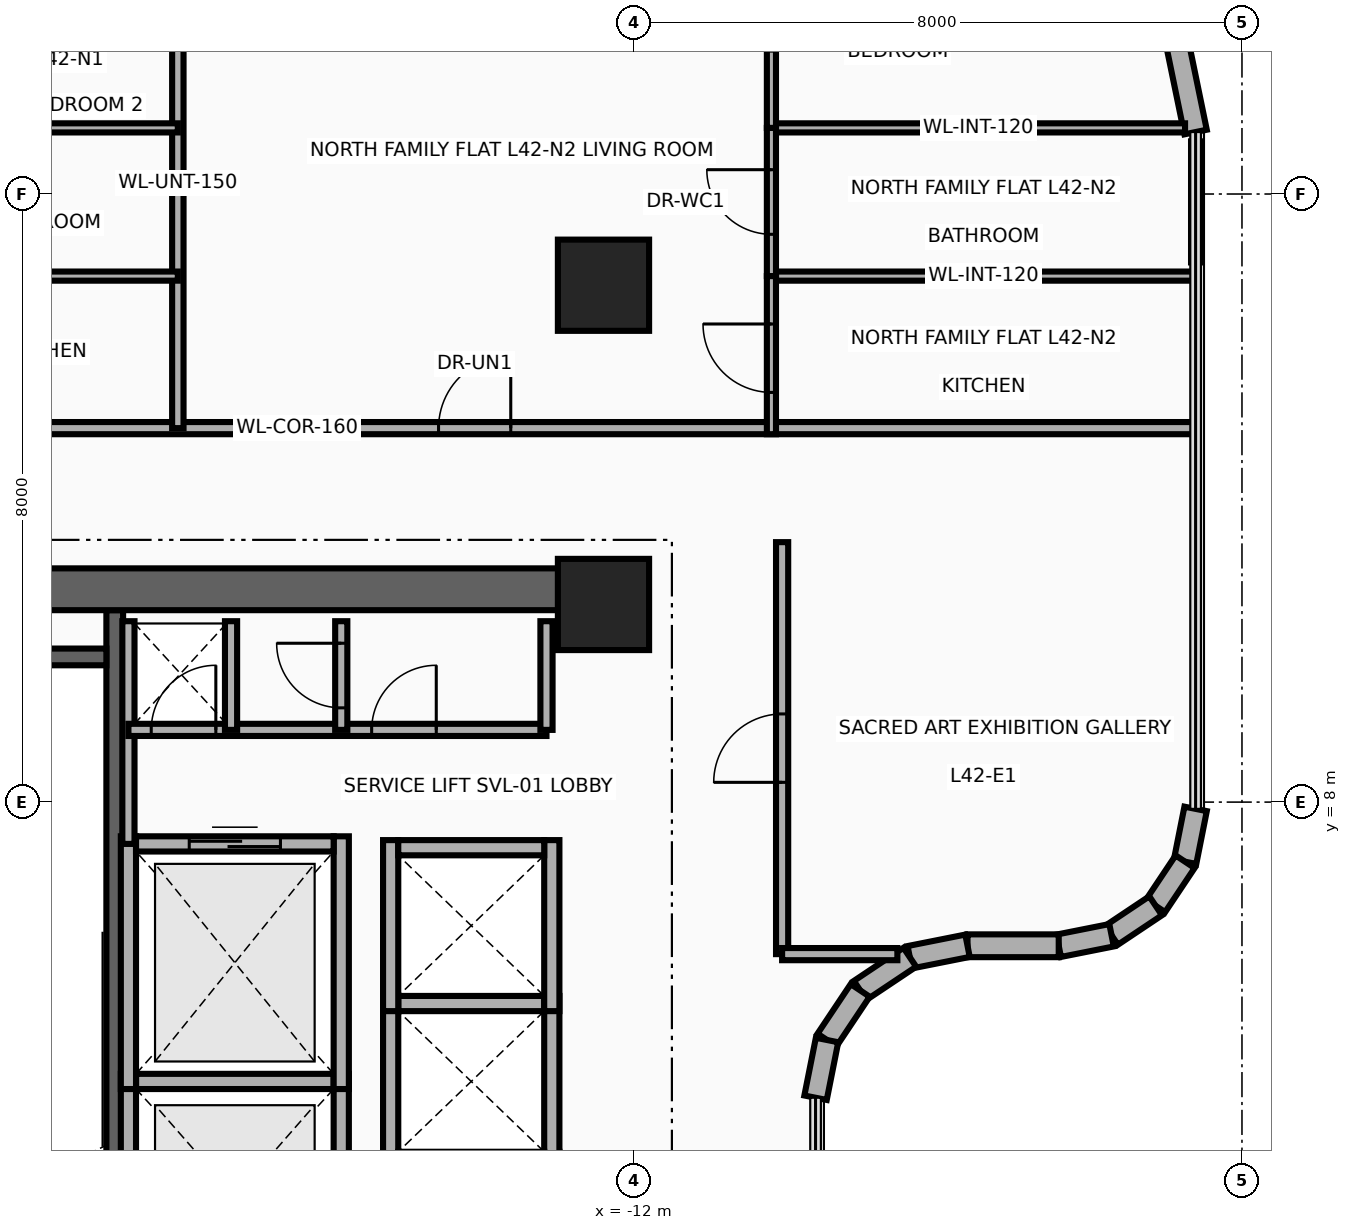
"""IFC4 building model, lengths in metres.
Left out: names, types, materials, properties, quantities, classifications, styles, units other than length and angle.
Written with IfcOpenShell. Run it as: python <this file> out.ifc"""

import sys

from ifc_helpers import new_model, si_unit, direction, frame, frame_2d, origin, origin_2d, place, context, subcontext, project, spatial, rectangle, extrude, source, transform, mapped, element, fill, save


model = new_model("IFC4")
c1 = context("Model", 3, precision=1e-05, world=origin(), true_north=direction((0.0, 1.0)))
c2 = subcontext(c1, "Body", "Model", "MODEL_VIEW")
j1 = project(units=[si_unit("LENGTHUNIT", "METRE"), si_unit("PLANEANGLEUNIT", "RADIAN")], contexts=[c1])
p1 = place(None, origin())
s1 = spatial("IfcSite", under=j1, at=p1, CompositionType="ELEMENT")
p2 = place(p1, origin())
s2 = spatial("IfcBuilding", under=s1, at=p2, CompositionType="ELEMENT")
p3 = place(p2, frame((0.0, 0.0, 164.9)))
s3 = spatial("IfcBuildingStorey", under=s2, at=p3, CompositionType="ELEMENT", Elevation=164.9)
p4 = place(p3, frame((-18.83, 1.78, 0.0), z_axis=(0.0, 0.0, 1.0), x_axis=(0.0, 1.0, 0.0)))
e1 = element("IfcWall", 1, at=p4, inside=s3, PredefinedType="SHEAR", context=c2, shape_type="SweptSolid", body=[
    extrude(rectangle(XDim=8.745, YDim=0.22, at=frame_2d((4.373, 0.0))), origin(), (0.0, 0.0, 1.0), 3.46),
])
p5 = place(p3, frame((-22.05, 9.91, 0.0), z_axis=(0.0, 0.0, 1.0), x_axis=(1.0, 0.0, 0.0)))
e2 = element("IfcWall", 2, at=p5, inside=s3, PredefinedType="SHEAR", context=c2, shape_type="SweptSolid", body=[
    extrude(rectangle(XDim=3.11, YDim=0.22, at=frame_2d((1.555, 0.0))), origin(), (0.0, 0.0, 1.0), 3.46),
])
p6 = place(p3, frame((-22.65, 10.8, 0.0), z_axis=(0.0, 0.0, 1.0), x_axis=(1.0, 0.0, 0.0)))
e3 = element("IfcWall", 3, at=p6, inside=s3, PredefinedType="SHEAR", context=c2, shape_type="SweptSolid", body=[
    extrude(rectangle(XDim=10.25, YDim=0.55, at=frame_2d((5.125, 0.0))), origin(), (0.0, 0.0, 1.0), 3.46),
])
m1 = source(origin(), c2, "Body", "SweptSolid", [
    extrude(rectangle(XDim=1.2, YDim=1.2, at=origin_2d()), origin(), (0.0, 0.0, 1.0), 3.7),
])
for number, where, z_axis, x_axis in (
    (4, (-12.4, 10.6, 0.0), (0.0, 0.0, 1.0), (1.0, 0.0, 0.0)),
    (5, (-12.4, 14.8, 0.0), (0.0, 0.0, 1.0), (1.0, 0.0, 0.0)),
):
    element("IfcColumn", number, at=place(p3, frame(where, z_axis=z_axis, x_axis=x_axis)), inside=s3, PredefinedType="COLUMN", context=c2, shape_type="MappedRepresentation", body=[
        mapped(m1, transform((0.0, 0.0, 0.0), x_axis=(1.0, 0.0, 0.0), y_axis=(0.0, 1.0, 0.0), z_axis=(0.0, 0.0, 1.0), scale=1.0)),
    ])
p7 = place(p3, frame((-4.863, 18.046, 0.0), z_axis=(0.0, 0.0, 1.0), x_axis=(0.201532282172, -0.97948187285, 0.0)))
e6 = element("IfcWall", 6, at=p7, inside=s3, PredefinedType="SOLIDWALL", context=c2, shape_type="SweptSolid", body=[
    extrude(rectangle(XDim=1.256, YDim=0.3, at=frame_2d((0.628, 0.0))), origin(), (0.0, 0.0, 1.0), 3.46),
])
p8 = place(p3, frame((-4.61, 7.911, 0.0), z_axis=(0.0, 0.0, 1.0), x_axis=(-0.194989739953, -0.980805282058, 0.0)))
e7 = element("IfcWall", 7, at=p8, inside=s3, PredefinedType="SOLIDWALL", context=c2, shape_type="SweptSolid", body=[
    extrude(rectangle(XDim=0.709, YDim=0.3, at=frame_2d((0.354, 0.0))), origin(), (0.0, 0.0, 1.0), 3.46),
])
for number, where, z_axis, x_axis in (
    (8, (-4.748, 7.216, 0.0), (0.0, 0.0, 1.0), (-0.555, -0.832, 0.0)),
    (9, (-5.136, 6.636, 0.0), (0.0, 0.0, 1.0), (-0.832, -0.555, 0.0)),
):
    element("IfcWall", number, at=place(p3, frame(where, z_axis=z_axis, x_axis=x_axis)), inside=s3, PredefinedType="SOLIDWALL", context=c2, shape_type="SweptSolid", body=[
        extrude(rectangle(XDim=0.698, YDim=0.3, at=frame_2d((0.349, 0.0))), origin(), (0.0, 0.0, 1.0), 3.46),
    ])
p9 = place(p3, frame((-5.716, 6.248, 0.0), z_axis=(0.0, 0.0, 1.0), x_axis=(-0.980805282058, -0.194989739953, 0.0)))
e10 = element("IfcWall", 10, at=p9, inside=s3, PredefinedType="SOLIDWALL", context=c2, shape_type="SweptSolid", body=[
    extrude(rectangle(XDim=0.709, YDim=0.3, at=frame_2d((0.354, 0.0))), origin(), (0.0, 0.0, 1.0), 3.46),
])
p10 = place(p3, frame((-6.411, 6.11, 0.0), z_axis=(0.0, 0.0, 1.0), x_axis=(-1.0, 0.0, 0.0)))
e11 = element("IfcWall", 11, at=p10, inside=s3, PredefinedType="SOLIDWALL", context=c2, shape_type="SweptSolid", body=[
    extrude(rectangle(XDim=1.2, YDim=0.3, at=frame_2d((0.6, 0.0))), origin(), (0.0, 0.0, 1.0), 3.46),
])
p11 = place(p3, frame((-7.611, 6.11, 0.0), z_axis=(0.0, 0.0, 1.0), x_axis=(-0.98076219082, -0.195206365311, 0.0)))
e12 = element("IfcWall", 12, at=p11, inside=s3, PredefinedType="SOLIDWALL", context=c2, shape_type="SweptSolid", body=[
    extrude(rectangle(XDim=0.774, YDim=0.3, at=frame_2d((0.387, 0.0))), origin(), (0.0, 0.0, 1.0), 3.46),
])
for number, where, z_axis, x_axis in (
    (13, (-8.37, 5.959, 0.0), (0.0, 0.0, 1.0), (-0.831, -0.556, 0.0)),
    (14, (-9.023, 5.523, 0.0), (0.0, 0.0, 1.0), (-0.556, -0.831, 0.0)),
):
    element("IfcWall", number, at=place(p3, frame(where, z_axis=z_axis, x_axis=x_axis)), inside=s3, PredefinedType="SOLIDWALL", context=c2, shape_type="SweptSolid", body=[
        extrude(rectangle(XDim=0.785, YDim=0.3, at=frame_2d((0.393, 0.0))), origin(), (0.0, 0.0, 1.0), 3.46),
    ])
p12 = place(p3, frame((-9.459, 4.87, 0.0), z_axis=(0.0, 0.0, 1.0), x_axis=(-0.195206365311, -0.98076219082, 0.0)))
e15 = element("IfcWall", 15, at=p12, inside=s3, PredefinedType="SOLIDWALL", context=c2, shape_type="SweptSolid", body=[
    extrude(rectangle(XDim=0.774, YDim=0.3, at=frame_2d((0.387, 0.0))), origin(), (0.0, 0.0, 1.0), 3.46),
])
for number, where, z_axis, x_axis in (
    (16, (-18.65, 1.2, 0.0), (0.0, 0.0, 1.0), (0.0, 1.0, 0.0)),
    (17, (-15.85, 1.2, 0.0), (0.0, 0.0, 1.0), (0.0, 1.0, 0.0)),
):
    element("IfcWall", number, at=place(p3, frame(where, z_axis=z_axis, x_axis=x_axis)), inside=s3, PredefinedType="MOVABLE", context=c2, shape_type="SweptSolid", body=[
        extrude(rectangle(XDim=3.225, YDim=0.2, at=frame_2d((1.613, 0.0))), origin(), (0.0, 0.0, 1.0), 3.46),
    ])
p13 = place(p3, frame((-18.55, 4.325, 0.0), z_axis=(0.0, 0.0, 1.0), x_axis=(1.0, 0.0, 0.0)))
e18 = element("IfcWall", 18, at=p13, inside=s3, PredefinedType="MOVABLE", context=c2, shape_type="SweptSolid", body=[
    extrude(rectangle(XDim=2.6, YDim=0.2, at=frame_2d((1.3, 0.0))), origin(), (0.0, 0.0, 1.0), 3.46),
])
for number, where, z_axis, x_axis in (
    (19, (-18.65, 4.225, 0.0), (0.0, 0.0, 1.0), (0.0, 1.0, 0.0)),
    (20, (-15.85, 4.225, 0.0), (0.0, 0.0, 1.0), (0.0, 1.0, 0.0)),
):
    element("IfcWall", number, at=place(p3, frame(where, z_axis=z_axis, x_axis=x_axis)), inside=s3, PredefinedType="MOVABLE", context=c2, shape_type="SweptSolid", body=[
        extrude(rectangle(XDim=3.325, YDim=0.2, at=frame_2d((1.663, 0.0))), origin(), (0.0, 0.0, 1.0), 3.46),
    ])
p14 = place(p3, frame((-18.55, 7.45, 0.0), z_axis=(0.0, 0.0, 1.0), x_axis=(1.0, 0.0, 0.0)))
e21 = element("IfcWall", 21, at=p14, inside=s3, PredefinedType="MOVABLE", context=c2, shape_type="SweptSolid", body=[
    extrude(rectangle(XDim=2.6, YDim=0.2, at=frame_2d((1.3, 0.0))), origin(), (0.0, 0.0, 1.0), 3.46),
])
p15 = place(p14, frame((0.7, 0.0, 0.0)))
e22 = element("IfcOpeningElement", 22, at=p15, cuts=e21, PredefinedType="OPENING", context=c2, shape_type="SweptSolid", body=[
    extrude(rectangle(XDim=1.2, YDim=2.1, at=frame_2d((0.6, 1.05))), frame((0.0, 0.115, 0.0), z_axis=(0.0, -1.0, 0.0), x_axis=(1.0, 0.0, 0.0)), (0.0, 0.0, 1.0), 0.23),
])
for number, where, z_axis, x_axis in (
    (23, (-15.2, 3.2, 0.0), (0.0, 0.0, 1.0), (0.0, 1.0, 0.0)),
    (24, (-13.08, 3.2, 0.0), (0.0, 0.0, 1.0), (0.0, 1.0, 0.0)),
):
    element("IfcWall", number, at=place(p3, frame(where, z_axis=z_axis, x_axis=x_axis)), inside=s3, PredefinedType="MOVABLE", context=c2, shape_type="SweptSolid", body=[
        extrude(rectangle(XDim=2.25, YDim=0.2, at=frame_2d((1.125, 0.0))), origin(), (0.0, 0.0, 1.0), 3.46),
    ])
p16 = place(p3, frame((-15.1, 5.35, 0.0), z_axis=(0.0, 0.0, 1.0), x_axis=(1.0, 0.0, 0.0)))
e25 = element("IfcWall", 25, at=p16, inside=s3, PredefinedType="MOVABLE", context=c2, shape_type="SweptSolid", body=[
    extrude(rectangle(XDim=1.92, YDim=0.2, at=frame_2d((0.96, 0.0))), origin(), (0.0, 0.0, 1.0), 3.46),
])
for number, where, z_axis, x_axis in (
    (26, (-15.2, 5.25, 0.0), (0.0, 0.0, 1.0), (0.0, 1.0, 0.0)),
    (27, (-13.08, 5.25, 0.0), (0.0, 0.0, 1.0), (0.0, 1.0, 0.0)),
):
    element("IfcWall", number, at=place(p3, frame(where, z_axis=z_axis, x_axis=x_axis)), inside=s3, PredefinedType="MOVABLE", context=c2, shape_type="SweptSolid", body=[
        extrude(rectangle(XDim=2.25, YDim=0.2, at=frame_2d((1.125, 0.0))), origin(), (0.0, 0.0, 1.0), 3.46),
    ])
p17 = place(p3, frame((-15.1, 7.4, 0.0), z_axis=(0.0, 0.0, 1.0), x_axis=(1.0, 0.0, 0.0)))
e28 = element("IfcWall", 28, at=p17, inside=s3, PredefinedType="MOVABLE", context=c2, shape_type="SweptSolid", body=[
    extrude(rectangle(XDim=1.92, YDim=0.2, at=frame_2d((0.96, 0.0))), origin(), (0.0, 0.0, 1.0), 3.46),
])
p18 = place(p3, frame((-18.65, 7.45, 0.0), z_axis=(0.0, 0.0, 1.0), x_axis=(0.0, 1.0, 0.0)))
e29 = element("IfcWall", 29, at=p18, inside=s3, PredefinedType="PARTITIONING", context=c2, shape_type="SweptSolid", body=[
    extrude(rectangle(XDim=2.93, YDim=0.16, at=frame_2d((1.465, 0.0))), origin(), (0.0, 0.0, 1.0), 3.46),
])
p19 = place(p3, frame((-18.65, 8.95, 0.0), z_axis=(0.0, 0.0, 1.0), x_axis=(1.0, 0.0, 0.0)))
e30 = element("IfcWall", 30, at=p19, inside=s3, PredefinedType="PARTITIONING", context=c2, shape_type="SweptSolid", body=[
    extrude(rectangle(XDim=5.5, YDim=0.16, at=frame_2d((2.75, 0.0))), origin(), (0.0, 0.0, 1.0), 3.46),
])
p20 = place(p19, frame((0.3, 0.0, 0.0)))
e31 = element("IfcOpeningElement", 31, at=p20, cuts=e30, PredefinedType="OPENING", context=c2, shape_type="SweptSolid", body=[
    extrude(rectangle(XDim=0.85, YDim=2.05, at=frame_2d((0.425, 1.025))), frame((0.0, 0.095, 0.0), z_axis=(0.0, -1.0, 0.0), x_axis=(1.0, 0.0, 0.0)), (0.0, 0.0, 1.0), 0.19),
])
p21 = place(p19, frame((3.2, 0.0, 0.0)))
e32 = element("IfcOpeningElement", 32, at=p21, cuts=e30, PredefinedType="OPENING", context=c2, shape_type="SweptSolid", body=[
    extrude(rectangle(XDim=0.85, YDim=2.05, at=frame_2d((0.425, 1.025))), frame((0.0, 0.095, 0.0), z_axis=(0.0, -1.0, 0.0), x_axis=(1.0, 0.0, 0.0)), (0.0, 0.0, 1.0), 0.19),
])
for number, where, z_axis, x_axis in (
    (33, (-13.15, 8.95, 0.0), (0.0, 0.0, 1.0), (0.0, 1.0, 0.0)),
    (34, (-17.3, 8.95, 0.0), (0.0, 0.0, 1.0), (0.0, 1.0, 0.0)),
):
    element("IfcWall", number, at=place(p3, frame(where, z_axis=z_axis, x_axis=x_axis)), inside=s3, PredefinedType="PARTITIONING", context=c2, shape_type="SweptSolid", body=[
        extrude(rectangle(XDim=1.43, YDim=0.16, at=frame_2d((0.715, 0.0))), origin(), (0.0, 0.0, 1.0), 3.46),
    ])
p22 = place(p3, frame((-15.85, 8.95, 0.0), z_axis=(0.0, 0.0, 1.0), x_axis=(0.0, 1.0, 0.0)))
e35 = element("IfcWall", 35, at=p22, inside=s3, PredefinedType="PARTITIONING", context=c2, shape_type="SweptSolid", body=[
    extrude(rectangle(XDim=1.43, YDim=0.16, at=frame_2d((0.715, 0.0))), origin(), (0.0, 0.0, 1.0), 3.46),
])
p23 = place(p22, frame((0.29, 0.0, 0.0)))
e36 = element("IfcOpeningElement", 36, at=p23, cuts=e35, PredefinedType="OPENING", context=c2, shape_type="SweptSolid", body=[
    extrude(rectangle(XDim=0.85, YDim=2.05, at=frame_2d((0.425, 1.025))), frame((0.0, 0.095, 0.0), z_axis=(0.0, -1.0, 0.0), x_axis=(1.0, 0.0, 0.0)), (0.0, 0.0, 1.0), 0.19),
])
p24 = place(p3, frame((-28.25, 12.92, 0.0), z_axis=(0.0, 0.0, 1.0), x_axis=(1.0, 0.0, 0.0)))
e37 = element("IfcWall", 37, at=p24, inside=s3, PredefinedType="PARTITIONING", context=c2, shape_type="SweptSolid", body=[
    extrude(rectangle(XDim=23.64, YDim=0.16, at=frame_2d((11.82, 0.0))), origin(), (0.0, 0.0, 1.0), 2.834),
])
p25 = place(p24, frame((1.107, 0.0, 0.0)))
e38 = element("IfcOpeningElement", 38, at=p25, cuts=e37, PredefinedType="OPENING", context=c2, shape_type="SweptSolid", body=[
    extrude(rectangle(XDim=0.95, YDim=2.15, at=frame_2d((0.475, 1.075))), frame((0.0, 0.095, 0.0), z_axis=(0.0, -1.0, 0.0), x_axis=(1.0, 0.0, 0.0)), (0.0, 0.0, 1.0), 0.19),
])
p26 = place(p24, frame((13.68, 0.0, 0.0)))
e39 = element("IfcOpeningElement", 39, at=p26, cuts=e37, PredefinedType="OPENING", context=c2, shape_type="SweptSolid", body=[
    extrude(rectangle(XDim=0.95, YDim=2.15, at=frame_2d((0.475, 1.075))), frame((0.0, 0.095, 0.0), z_axis=(0.0, -1.0, 0.0), x_axis=(1.0, 0.0, 0.0)), (0.0, 0.0, 1.0), 0.19),
])
p27 = place(p3, frame((-18.0, 12.92, 0.0), z_axis=(0.0, 0.0, 1.0), x_axis=(0.0, 1.0, 0.0)))
e40 = element("IfcWall", 40, at=p27, inside=s3, PredefinedType="PARTITIONING", context=c2, shape_type="SweptSolid", body=[
    extrude(rectangle(XDim=6.457, YDim=0.15, at=frame_2d((3.229, 0.0))), origin(), (0.0, 0.0, 1.0), 2.666),
])
p28 = place(p3, frame((-25.085, 14.92, 0.0), z_axis=(0.0, 0.0, 1.0), x_axis=(1.0, 0.0, 0.0)))
e41 = element("IfcWall", 41, at=p28, inside=s3, PredefinedType="PARTITIONING", context=c2, shape_type="SweptSolid", body=[
    extrude(rectangle(XDim=7.085, YDim=0.12, at=frame_2d((3.542, 0.0))), origin(), (0.0, 0.0, 1.0), 2.666),
])
p29 = place(p3, frame((-25.085, 16.87, 0.0), z_axis=(0.0, 0.0, 1.0), x_axis=(1.0, 0.0, 0.0)))
e42 = element("IfcWall", 42, at=p29, inside=s3, PredefinedType="PARTITIONING", context=c2, shape_type="SweptSolid", body=[
    extrude(rectangle(XDim=7.085, YDim=0.12, at=frame_2d((3.542, 0.0))), origin(), (0.0, 0.0, 1.0), 3.46),
])
p30 = place(p3, frame((-10.191, 14.92, 0.0), z_axis=(0.0, 0.0, 1.0), x_axis=(1.0, 0.0, 0.0)))
e43 = element("IfcWall", 43, at=p30, inside=s3, PredefinedType="PARTITIONING", context=c2, shape_type="SweptSolid", body=[
    extrude(rectangle(XDim=5.581, YDim=0.12, at=frame_2d((2.79, 0.0))), origin(), (0.0, 0.0, 1.0), 3.46),
])
p31 = place(p3, frame((-10.191, 16.87, 0.0), z_axis=(0.0, 0.0, 1.0), x_axis=(1.0, 0.0, 0.0)))
e44 = element("IfcWall", 44, at=p31, inside=s3, PredefinedType="PARTITIONING", context=c2, shape_type="SweptSolid", body=[
    extrude(rectangle(XDim=5.442, YDim=0.12, at=frame_2d((2.721, 0.0))), origin(), (0.0, 0.0, 1.0), 3.46),
])
p32 = place(p3, frame((-10.191, 14.92, 0.0), z_axis=(0.0, 0.0, 1.0), x_axis=(0.0, 1.0, 0.0)))
e45 = element("IfcWall", 45, at=p32, inside=s3, PredefinedType="PARTITIONING", context=c2, shape_type="SweptSolid", body=[
    extrude(rectangle(XDim=1.95, YDim=0.12, at=frame_2d((0.975, 0.0))), origin(), (0.0, 0.0, 1.0), 3.46),
])
p33 = place(p32, frame((0.55, 0.0, 0.0)))
e46 = element("IfcOpeningElement", 46, at=p33, cuts=e45, PredefinedType="OPENING", context=c2, shape_type="SweptSolid", body=[
    extrude(rectangle(XDim=0.85, YDim=2.1, at=frame_2d((0.425, 1.05))), frame((0.0, 0.075, 0.0), z_axis=(0.0, -1.0, 0.0), x_axis=(1.0, 0.0, 0.0)), (0.0, 0.0, 1.0), 0.15),
])
p34 = place(p3, frame((-10.191, 12.84, 0.0), z_axis=(0.0, 0.0, 1.0), x_axis=(0.0, 1.0, 0.0)))
e47 = element("IfcWall", 47, at=p34, inside=s3, PredefinedType="PARTITIONING", context=c2, shape_type="SweptSolid", body=[
    extrude(rectangle(XDim=2.08, YDim=0.12, at=frame_2d((1.04, 0.0))), origin(), (0.0, 0.0, 1.0), 3.46),
])
p35 = place(p34, frame((0.55, 0.0, 0.0)))
e48 = element("IfcOpeningElement", 48, at=p35, cuts=e47, PredefinedType="OPENING", context=c2, shape_type="SweptSolid", body=[
    extrude(rectangle(XDim=0.9, YDim=2.1, at=frame_2d((0.45, 1.05))), frame((0.0, 0.075, 0.0), z_axis=(0.0, -1.0, 0.0), x_axis=(1.0, 0.0, 0.0)), (0.0, 0.0, 1.0), 0.15),
])
p36 = place(p3, frame((-10.191, 16.87, 0.0), z_axis=(0.0, 0.0, 1.0), x_axis=(0.0, 1.0, 0.0)))
e49 = element("IfcWall", 49, at=p36, inside=s3, PredefinedType="PARTITIONING", context=c2, shape_type="SweptSolid", body=[
    extrude(rectangle(XDim=2.919, YDim=0.12, at=frame_2d((1.459, 0.0))), origin(), (0.0, 0.0, 1.0), 3.46),
])
p37 = place(p36, frame((1.01, 0.0, 0.0)))
e50 = element("IfcOpeningElement", 50, at=p37, cuts=e49, PredefinedType="OPENING", context=c2, shape_type="SweptSolid", body=[
    extrude(rectangle(XDim=0.9, YDim=2.1, at=frame_2d((0.45, 1.05))), frame((0.0, 0.075, 0.0), z_axis=(0.0, -1.0, 0.0), x_axis=(1.0, 0.0, 0.0)), (0.0, 0.0, 1.0), 0.15),
])
p38 = place(p3, frame((-4.61, 15.1, 0.0), z_axis=(0.0, 0.0, 1.0), x_axis=(0.0, 1.0, 0.0)))
e51 = element("IfcWall", 51, at=p38, inside=s3, PredefinedType="PARTITIONING", context=c2, shape_type="SweptSolid", body=[
    extrude(rectangle(XDim=1.593, YDim=0.12, at=frame_2d((0.796, 0.0))), origin(), (0.0, 0.0, 1.0), 3.46),
])
p39 = place(p3, frame((-10.05, 6.0, 0.0), z_axis=(0.0, 0.0, 1.0), x_axis=(0.0, 1.0, 0.0)))
e52 = element("IfcWall", 52, at=p39, inside=s3, PredefinedType="PARTITIONING", context=c2, shape_type="SweptSolid", body=[
    extrude(rectangle(XDim=5.42, YDim=0.16, at=frame_2d((2.71, 0.0))), origin(), (0.0, 0.0, 1.0), 3.46),
])
p40 = place(p39, frame((2.26, 0.0, 0.0)))
e53 = element("IfcOpeningElement", 53, at=p40, cuts=e52, PredefinedType="OPENING", context=c2, shape_type="SweptSolid", body=[
    extrude(rectangle(XDim=0.9, YDim=2.1, at=frame_2d((0.45, 1.05))), frame((0.0, 0.095, 0.0), z_axis=(0.0, -1.0, 0.0), x_axis=(1.0, 0.0, 0.0)), (0.0, 0.0, 1.0), 0.19),
])
p41 = place(p3, frame((-10.05, 6.0, 0.0), z_axis=(0.0, 0.0, 1.0), x_axis=(1.0, 0.0, 0.0)))
e54 = element("IfcWall", 54, at=p41, inside=s3, PredefinedType="PARTITIONING", context=c2, shape_type="SweptSolid", body=[
    extrude(rectangle(XDim=1.516, YDim=0.16, at=frame_2d((0.758, 0.0))), origin(), (0.0, 0.0, 1.0), 3.46),
])
p42 = place(p15, origin())
e55 = element("IfcDoor", 55, at=p42, inside=s3, OperationType="DOUBLE_DOOR_SLIDING", PredefinedType="DOOR", context=c2, shape_type="SweptSolid", body=[
    extrude(rectangle(XDim=1.2, YDim=2.1, at=frame_2d((0.6, 1.05))), frame((0.0, 0.025, 0.0), z_axis=(0.0, -1.0, 0.0), x_axis=(1.0, 0.0, 0.0)), (0.0, 0.0, 1.0), 0.05),
])
fill(e22, e55)
p43 = place(p20, origin())
e56 = element("IfcDoor", 56, at=p43, inside=s3, OperationType="SINGLE_SWING_LEFT", PredefinedType="DOOR", context=c2, shape_type="SweptSolid", body=[
    extrude(rectangle(XDim=0.85, YDim=2.05, at=frame_2d((0.425, 1.025))), frame((0.0, 0.025, 0.0), z_axis=(0.0, -1.0, 0.0), x_axis=(1.0, 0.0, 0.0)), (0.0, 0.0, 1.0), 0.05),
])
fill(e31, e56)
p44 = place(p21, origin())
e57 = element("IfcDoor", 57, at=p44, inside=s3, OperationType="SINGLE_SWING_RIGHT", PredefinedType="DOOR", context=c2, shape_type="SweptSolid", body=[
    extrude(rectangle(XDim=0.85, YDim=2.05, at=frame_2d((0.425, 1.025))), frame((0.0, 0.025, 0.0), z_axis=(0.0, -1.0, 0.0), x_axis=(1.0, 0.0, 0.0)), (0.0, 0.0, 1.0), 0.05),
])
fill(e32, e57)
p45 = place(p23, origin())
e58 = element("IfcDoor", 58, at=p45, inside=s3, OperationType="SINGLE_SWING_LEFT", PredefinedType="DOOR", context=c2, shape_type="SweptSolid", body=[
    extrude(rectangle(XDim=0.85, YDim=2.05, at=frame_2d((0.425, 1.025))), frame((0.0, 0.025, 0.0), z_axis=(0.0, -1.0, 0.0), x_axis=(1.0, 0.0, 0.0)), (0.0, 0.0, 1.0), 0.05),
])
fill(e36, e58)
p46 = place(p26, origin())
e59 = element("IfcDoor", 59, at=p46, inside=s3, OperationType="SINGLE_SWING_RIGHT", PredefinedType="DOOR", context=c2, shape_type="SweptSolid", body=[
    extrude(rectangle(XDim=0.95, YDim=2.15, at=frame_2d((0.475, 1.075))), frame((0.0, 0.025, 0.0), z_axis=(0.0, -1.0, 0.0), x_axis=(1.0, 0.0, 0.0)), (0.0, 0.0, 1.0), 0.05),
])
fill(e39, e59)
p47 = place(p33, origin())
e60 = element("IfcDoor", 60, at=p47, inside=s3, OperationType="SINGLE_SWING_LEFT", PredefinedType="DOOR", context=c2, shape_type="SweptSolid", body=[
    extrude(rectangle(XDim=0.85, YDim=2.1, at=frame_2d((0.425, 1.05))), frame((0.0, 0.025, 0.0), z_axis=(0.0, -1.0, 0.0), x_axis=(1.0, 0.0, 0.0)), (0.0, 0.0, 1.0), 0.05),
])
fill(e46, e60)
p48 = place(p35, origin())
e61 = element("IfcDoor", 61, at=p48, inside=s3, OperationType="SINGLE_SWING_RIGHT", PredefinedType="DOOR", context=c2, shape_type="SweptSolid", body=[
    extrude(rectangle(XDim=0.9, YDim=2.1, at=frame_2d((0.45, 1.05))), frame((0.0, 0.025, 0.0), z_axis=(0.0, -1.0, 0.0), x_axis=(1.0, 0.0, 0.0)), (0.0, 0.0, 1.0), 0.05),
])
fill(e48, e61)
p49 = place(p40, origin())
e62 = element("IfcDoor", 62, at=p49, inside=s3, OperationType="SINGLE_SWING_RIGHT", PredefinedType="DOOR", context=c2, shape_type="SweptSolid", body=[
    extrude(rectangle(XDim=0.9, YDim=2.1, at=frame_2d((0.45, 1.05))), frame((0.0, 0.025, 0.0), z_axis=(0.0, -1.0, 0.0), x_axis=(1.0, 0.0, 0.0)), (0.0, 0.0, 1.0), 0.05),
])
fill(e53, e62)
save(model, sys.argv[1])
